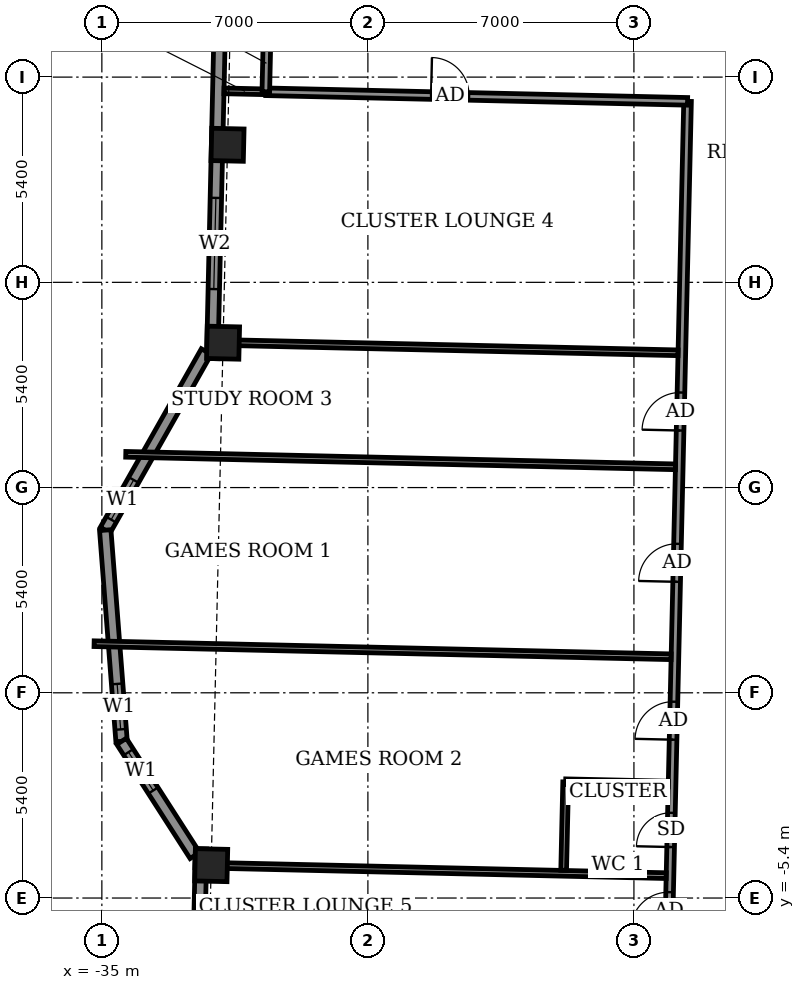
"""IFC4 building model, lengths in metres.
Left out: names, types, materials, properties, quantities, classifications, styles, units other than length and angle.
Written with IfcOpenShell. Run it as: python <this file> out.ifc"""

import sys

from ifc_helpers import new_model, si_unit, direction, frame, frame_2d, origin, origin_2d, place, context, subcontext, project, spatial, rectangle, extrude, element, fill, save


model = new_model("IFC4")
c1 = context("Model", 3, precision=1e-05, world=origin(), true_north=direction((0.0, 1.0)))
c2 = subcontext(c1, "Body", "Model", "MODEL_VIEW")
j1 = project(units=[si_unit("LENGTHUNIT", "METRE"), si_unit("PLANEANGLEUNIT", "RADIAN")], contexts=[c1])
p1 = place(None, origin())
s1 = spatial("IfcSite", under=j1, at=p1, CompositionType="ELEMENT")
p2 = place(p1, origin())
s2 = spatial("IfcBuilding", under=s1, at=p2, CompositionType="ELEMENT")
p3 = place(p2, frame((0.0, 0.0, 316.9)))
s3 = spatial("IfcBuildingStorey", under=s2, at=p3, CompositionType="ELEMENT", Elevation=316.9)
for number, where, z_axis, x_axis in (
    (1, (-32.123, -4.535, -0.55), (0.0, 0.0, 1.0), (-0.023, -1.0, 0.0)),
    (2, (-31.693, 14.419, -0.55), (0.0, 0.0, 1.0), (-0.023, -1.0, 0.0)),
    (3, (-31.811, 9.212, -0.55), (0.0, 0.0, 1.0), (-0.023, -1.0, 0.0)),
):
    element("IfcColumn", number, at=place(p3, frame(where, z_axis=z_axis, x_axis=x_axis)), inside=s3, PredefinedType="COLUMN", context=c2, shape_type="SweptSolid", body=[
        extrude(rectangle(XDim=0.85, YDim=0.85, at=origin_2d()), origin(), (0.0, 0.0, 1.0), 3.6),
    ])
p4 = place(p3, frame((-31.735, 24.69, 0.0), z_axis=(0.0, 0.0, 1.0), x_axis=(-0.022694199758, -0.999742453484, 0.0)))
e4 = element("IfcWall", 4, at=p4, inside=s3, PredefinedType="SOLIDWALL", context=c2, shape_type="SweptSolid", body=[
    extrude(rectangle(XDim=15.9, YDim=0.3, at=frame_2d((7.95, 0.0))), origin(), (0.0, 0.0, 1.0), 2.55),
])
p5 = place(p4, frame((1.939, 0.0, 0.0)))
e5 = element("IfcOpeningElement", 5, at=p5, cuts=e4, PredefinedType="OPENING", context=c2, shape_type="SweptSolid", body=[
    extrude(rectangle(XDim=1.5, YDim=2.4, at=frame_2d((0.75, 1.2))), frame((0.0, 0.16, 0.0), z_axis=(0.0, -1.0, 0.0), x_axis=(1.0, 0.0, 0.0)), (0.0, 0.0, 1.0), 0.32),
])
p6 = place(p4, frame((11.671, 0.0, 0.9)))
e6 = element("IfcOpeningElement", 6, at=p6, cuts=e4, PredefinedType="OPENING", context=c2, shape_type="SweptSolid", body=[
    extrude(rectangle(XDim=2.4, YDim=1.5, at=frame_2d((1.2, 0.75))), frame((0.0, 0.16, 0.0), z_axis=(0.0, -1.0, 0.0), x_axis=(1.0, 0.0, 0.0)), (0.0, 0.0, 1.0), 0.32),
])
p7 = place(p3, frame((-32.252, 8.978, 0.0), z_axis=(0.0, 0.0, 1.0), x_axis=(-0.492554919955, -0.870281363025, 0.0)))
e7 = element("IfcWall", 7, at=p7, inside=s3, PredefinedType="SOLIDWALL", context=c2, shape_type="SweptSolid", body=[
    extrude(rectangle(XDim=5.398, YDim=0.3, at=frame_2d((2.699, 0.0))), origin(), (0.0, 0.0, 1.0), 3.05),
])
p8 = place(p7, frame((3.881, 0.0, 0.9)))
e8 = element("IfcOpeningElement", 8, at=p8, cuts=e7, PredefinedType="OPENING", context=c2, shape_type="SweptSolid", body=[
    extrude(rectangle(XDim=1.2, YDim=1.5, at=frame_2d((0.6, 0.75))), frame((0.0, 0.16, 0.0), z_axis=(0.0, -1.0, 0.0), x_axis=(1.0, 0.0, 0.0)), (0.0, 0.0, 1.0), 0.32),
])
p9 = place(p3, frame((-34.911, 4.28, 0.0), z_axis=(0.0, 0.0, 1.0), x_axis=(0.077135284219, -0.997020635658, 0.0)))
e9 = element("IfcWall", 9, at=p9, inside=s3, PredefinedType="SOLIDWALL", context=c2, shape_type="SweptSolid", body=[
    extrude(rectangle(XDim=5.574, YDim=0.3, at=frame_2d((2.787, 0.0))), origin(), (0.0, 0.0, 1.0), 3.05),
])
p10 = place(p9, frame((4.058, 0.0, 0.9)))
e10 = element("IfcOpeningElement", 10, at=p10, cuts=e9, PredefinedType="OPENING", context=c2, shape_type="SweptSolid", body=[
    extrude(rectangle(XDim=1.2, YDim=1.5, at=frame_2d((0.6, 0.75))), frame((0.0, 0.16, 0.0), z_axis=(0.0, -1.0, 0.0), x_axis=(1.0, 0.0, 0.0)), (0.0, 0.0, 1.0), 0.32),
])
p11 = place(p3, frame((-34.481, -1.277, 0.0), z_axis=(0.0, 0.0, 1.0), x_axis=(0.540460234606, -0.841369558999, 0.0)))
e11 = element("IfcWall", 11, at=p11, inside=s3, PredefinedType="SOLIDWALL", context=c2, shape_type="SweptSolid", body=[
    extrude(rectangle(XDim=3.569, YDim=0.3, at=frame_2d((1.785, 0.0))), origin(), (0.0, 0.0, 1.0), 3.05),
])
p12 = place(p11, frame((0.338, 0.0, 0.9)))
e12 = element("IfcOpeningElement", 12, at=p12, cuts=e11, PredefinedType="OPENING", context=c2, shape_type="SweptSolid", body=[
    extrude(rectangle(XDim=1.2, YDim=1.5, at=frame_2d((0.6, 0.75))), frame((0.0, 0.16, 0.0), z_axis=(0.0, -1.0, 0.0), x_axis=(1.0, 0.0, 0.0)), (0.0, 0.0, 1.0), 0.32),
])
p13 = place(p3, frame((-32.388, -4.104, 0.0), z_axis=(0.0, 0.0, 1.0), x_axis=(-0.02270779533, -0.999742144771, 0.0)))
e13 = element("IfcWall", 13, at=p13, inside=s3, PredefinedType="SOLIDWALL", context=c2, shape_type="SweptSolid", body=[
    extrude(rectangle(XDim=16.299, YDim=0.3, at=frame_2d((8.149, 0.0))), origin(), (0.0, 0.0, 1.0), 2.55),
])
p14 = place(p13, frame((1.9, 0.0, 0.0)))
e14 = element("IfcOpeningElement", 14, at=p14, cuts=e13, PredefinedType="OPENING", context=c2, shape_type="SweptSolid", body=[
    extrude(rectangle(XDim=1.5, YDim=2.4, at=frame_2d((0.75, 1.2))), frame((0.0, 0.16, 0.0), z_axis=(0.0, -1.0, 0.0), x_axis=(1.0, 0.0, 0.0)), (0.0, 0.0, 1.0), 0.32),
])
p15 = place(p13, frame((6.396, 0.0, 0.9)))
e15 = element("IfcOpeningElement", 15, at=p15, cuts=e13, PredefinedType="OPENING", context=c2, shape_type="SweptSolid", body=[
    extrude(rectangle(XDim=0.9, YDim=1.5, at=frame_2d((0.45, 0.75))), frame((0.0, 0.16, 0.0), z_axis=(0.0, -1.0, 0.0), x_axis=(1.0, 0.0, 0.0)), (0.0, 0.0, 1.0), 0.32),
])
p16 = place(p13, frame((12.353, 0.0, 0.9)))
e16 = element("IfcOpeningElement", 16, at=p16, cuts=e13, PredefinedType="OPENING", context=c2, shape_type="SweptSolid", body=[
    extrude(rectangle(XDim=2.4, YDim=1.5, at=frame_2d((1.2, 0.75))), frame((0.0, 0.16, 0.0), z_axis=(0.0, -1.0, 0.0), x_axis=(1.0, 0.0, 0.0)), (0.0, 0.0, 1.0), 0.32),
])
p17 = place(p3, frame((-20.216, -12.081, 0.0), z_axis=(0.0, 0.0, 1.0), x_axis=(0.02267447203, 0.999742901109, 0.0)))
e17 = element("IfcWall", 17, at=p17, inside=s3, PredefinedType="PARTITIONING", context=c2, shape_type="SweptSolid", body=[
    extrude(rectangle(XDim=27.65, YDim=0.2, at=frame_2d((13.825, 0.0))), origin(), (0.0, 0.0, 1.0), 3.05),
])
p18 = place(p17, frame((18.987, 0.0, 0.0)))
e18 = element("IfcOpeningElement", 18, at=p18, cuts=e17, PredefinedType="OPENING", context=c2, shape_type="SweptSolid", body=[
    extrude(rectangle(XDim=1.0, YDim=2.1, at=frame_2d((0.5, 1.05))), frame((0.0, 0.11, 0.0), z_axis=(0.0, -1.0, 0.0), x_axis=(1.0, 0.0, 0.0)), (0.0, 0.0, 1.0), 0.22),
])
p19 = place(p17, frame((15.005, 0.0, 0.0)))
e19 = element("IfcOpeningElement", 19, at=p19, cuts=e17, PredefinedType="OPENING", context=c2, shape_type="SweptSolid", body=[
    extrude(rectangle(XDim=1.0, YDim=2.1, at=frame_2d((0.5, 1.05))), frame((0.0, 0.11, 0.0), z_axis=(0.0, -1.0, 0.0), x_axis=(1.0, 0.0, 0.0)), (0.0, 0.0, 1.0), 0.22),
])
p20 = place(p17, frame((10.85, 0.0, 0.0)))
e20 = element("IfcOpeningElement", 20, at=p20, cuts=e17, PredefinedType="OPENING", context=c2, shape_type="SweptSolid", body=[
    extrude(rectangle(XDim=1.0, YDim=2.1, at=frame_2d((0.5, 1.05))), frame((0.0, 0.11, 0.0), z_axis=(0.0, -1.0, 0.0), x_axis=(1.0, 0.0, 0.0)), (0.0, 0.0, 1.0), 0.22),
])
p21 = place(p17, frame((8.025, 0.0, 0.0)))
e21 = element("IfcOpeningElement", 21, at=p21, cuts=e17, PredefinedType="OPENING", context=c2, shape_type="SweptSolid", body=[
    extrude(rectangle(XDim=0.9, YDim=2.1, at=frame_2d((0.45, 1.05))), frame((0.0, 0.11, 0.0), z_axis=(0.0, -1.0, 0.0), x_axis=(1.0, 0.0, 0.0)), (0.0, 0.0, 1.0), 0.22),
])
p22 = place(p17, frame((5.837, 0.0, 0.0)))
e22 = element("IfcOpeningElement", 22, at=p22, cuts=e17, PredefinedType="OPENING", context=c2, shape_type="SweptSolid", body=[
    extrude(rectangle(XDim=1.0, YDim=2.1, at=frame_2d((0.5, 1.05))), frame((0.0, 0.11, 0.0), z_axis=(0.0, -1.0, 0.0), x_axis=(1.0, 0.0, 0.0)), (0.0, 0.0, 1.0), 0.22),
])
p23 = place(p17, frame((3.75, 0.0, 0.0)))
e23 = element("IfcOpeningElement", 23, at=p23, cuts=e17, PredefinedType="OPENING", context=c2, shape_type="SweptSolid", body=[
    extrude(rectangle(XDim=0.9, YDim=2.1, at=frame_2d((0.45, 1.05))), frame((0.0, 0.11, 0.0), z_axis=(0.0, -1.0, 0.0), x_axis=(1.0, 0.0, 0.0)), (0.0, 0.0, 1.0), 0.22),
])
p24 = place(p3, frame((-32.548, -4.529, 0.0), z_axis=(0.0, 0.0, 1.0), x_axis=(0.999741418644, -0.022739741597, 0.0)))
e24 = element("IfcWall", 24, at=p24, inside=s3, PredefinedType="PARTITIONING", context=c2, shape_type="SweptSolid", body=[
    extrude(rectangle(XDim=12.4, YDim=0.15, at=frame_2d((6.2, 0.0))), origin(), (0.0, 0.0, 1.0), 3.05),
])
p25 = place(p3, frame((-22.849, -4.67, 0.0), z_axis=(0.0, 0.0, 1.0), x_axis=(0.022885950011, 0.999738082346, 0.0)))
e25 = element("IfcWall", 25, at=p25, inside=s3, PredefinedType="PARTITIONING", context=c2, shape_type="SweptSolid", body=[
    extrude(rectangle(XDim=2.325, YDim=0.15, at=frame_2d((1.163, 0.0))), origin(), (0.0, 0.0, 1.0), 3.05),
])
p26 = place(p3, frame((-22.796, -2.34, 0.0), z_axis=(0.0, 0.0, 1.0), x_axis=(0.999746436932, -0.022518033722, 0.0)))
e26 = element("IfcWall", 26, at=p26, inside=s3, PredefinedType="PARTITIONING", context=c2, shape_type="SweptSolid", body=[
    extrude(rectangle(XDim=2.7, YDim=0.15, at=frame_2d((1.35, 0.0))), origin(), (0.0, 0.0, 1.0), 3.05),
])
p27 = place(p3, frame((-35.204, 1.292, 0.0), z_axis=(0.0, 0.0, 1.0), x_axis=(0.999743443088, -0.022650562973, 0.0)))
e27 = element("IfcWall", 27, at=p27, inside=s3, PredefinedType="PARTITIONING", context=c2, shape_type="SweptSolid", body=[
    extrude(rectangle(XDim=15.187, YDim=0.15, at=frame_2d((7.594, 0.0))), origin(), (0.0, 0.0, 1.0), 2.05),
])
p28 = place(p3, frame((-34.371, 6.275, 0.0), z_axis=(0.0, 0.0, 1.0), x_axis=(0.999741635135, -0.022730221665, 0.0)))
e28 = element("IfcWall", 28, at=p28, inside=s3, PredefinedType="PARTITIONING", context=c2, shape_type="SweptSolid", body=[
    extrude(rectangle(XDim=14.468, YDim=0.15, at=frame_2d((7.234, 0.0))), origin(), (0.0, 0.0, 1.0), 2.05),
])
p29 = place(p3, frame((-31.936, 9.22, 0.0), z_axis=(0.0, 0.0, 1.0), x_axis=(0.9997437175, -0.02263844782, 0.0)))
e29 = element("IfcWall", 29, at=p29, inside=s3, PredefinedType="PARTITIONING", context=c2, shape_type="SweptSolid", body=[
    extrude(rectangle(XDim=12.1, YDim=0.15, at=frame_2d((6.05, 0.0))), origin(), (0.0, 0.0, 1.0), 3.05),
])
p30 = place(p3, frame((-31.786, 15.838, 0.0), z_axis=(0.0, 0.0, 1.0), x_axis=(0.999745701647, -0.022550654924, 0.0)))
e30 = element("IfcWall", 30, at=p30, inside=s3, PredefinedType="PARTITIONING", context=c2, shape_type="SweptSolid", body=[
    extrude(rectangle(XDim=1.104, YDim=0.15, at=frame_2d((0.552, 0.0))), origin(), (0.0, 0.0, 1.0), 2.55),
])
p31 = place(p3, frame((-30.686, 15.814, 0.0), z_axis=(0.0, 0.0, 1.0), x_axis=(0.999742346277, -0.022698921993, 0.0)))
e31 = element("IfcWall", 31, at=p31, inside=s3, PredefinedType="PARTITIONING", context=c2, shape_type="SweptSolid", body=[
    extrude(rectangle(XDim=11.1, YDim=0.2, at=frame_2d((5.55, 0.0))), origin(), (0.0, 0.0, 1.0), 3.05),
])
p32 = place(p31, frame((4.35, 0.0, 0.0)))
e32 = element("IfcOpeningElement", 32, at=p32, cuts=e31, PredefinedType="OPENING", context=c2, shape_type="SweptSolid", body=[
    extrude(rectangle(XDim=1.0, YDim=2.1, at=frame_2d((0.5, 1.05))), frame((0.0, 0.11, 0.0), z_axis=(0.0, -1.0, 0.0), x_axis=(1.0, 0.0, 0.0)), (0.0, 0.0, 1.0), 0.22),
])
p33 = place(p3, frame((-30.686, 15.814, 0.0), z_axis=(0.0, 0.0, 1.0), x_axis=(0.022632637625, 0.99974384905, 0.0)))
e33 = element("IfcWall", 33, at=p33, inside=s3, PredefinedType="PARTITIONING", context=c2, shape_type="SweptSolid", body=[
    extrude(rectangle(XDim=1.5, YDim=0.2, at=frame_2d((0.75, 0.0))), origin(), (0.0, 0.0, 1.0), 3.05),
])
p34 = place(p3, frame((-30.652, 17.313, 0.0), z_axis=(0.0, 0.0, 1.0), x_axis=(0.999742623764, -0.02268669719, 0.0)))
e34 = element("IfcWall", 34, at=p34, inside=s3, PredefinedType="PARTITIONING", context=c2, shape_type="SweptSolid", body=[
    extrude(rectangle(XDim=58.8, YDim=0.2, at=frame_2d((29.4, 0.0))), origin(), (0.0, 0.0, 1.0), 3.05),
])
p35 = place(p34, frame((55.698, 0.0, 0.0)))
e35 = element("IfcOpeningElement", 35, at=p35, cuts=e34, PredefinedType="OPENING", context=c2, shape_type="SweptSolid", body=[
    extrude(rectangle(XDim=1.0, YDim=2.1, at=frame_2d((0.5, 1.05))), frame((0.0, 0.11, 0.0), z_axis=(0.0, -1.0, 0.0), x_axis=(1.0, 0.0, 0.0)), (0.0, 0.0, 1.0), 0.22),
])
p36 = place(p34, frame((49.0, 0.0, 0.0)))
e36 = element("IfcOpeningElement", 36, at=p36, cuts=e34, PredefinedType="OPENING", context=c2, shape_type="SweptSolid", body=[
    extrude(rectangle(XDim=0.9, YDim=2.1, at=frame_2d((0.45, 1.05))), frame((0.0, 0.11, 0.0), z_axis=(0.0, -1.0, 0.0), x_axis=(1.0, 0.0, 0.0)), (0.0, 0.0, 1.0), 0.22),
])
p37 = place(p34, frame((47.125, 0.0, 0.0)))
e37 = element("IfcOpeningElement", 37, at=p37, cuts=e34, PredefinedType="OPENING", context=c2, shape_type="SweptSolid", body=[
    extrude(rectangle(XDim=0.9, YDim=2.1, at=frame_2d((0.45, 1.05))), frame((0.0, 0.11, 0.0), z_axis=(0.0, -1.0, 0.0), x_axis=(1.0, 0.0, 0.0)), (0.0, 0.0, 1.0), 0.22),
])
p38 = place(p34, frame((40.425, 0.0, 0.0)))
e38 = element("IfcOpeningElement", 38, at=p38, cuts=e34, PredefinedType="OPENING", context=c2, shape_type="SweptSolid", body=[
    extrude(rectangle(XDim=0.9, YDim=2.1, at=frame_2d((0.45, 1.05))), frame((0.0, 0.11, 0.0), z_axis=(0.0, -1.0, 0.0), x_axis=(1.0, 0.0, 0.0)), (0.0, 0.0, 1.0), 0.22),
])
p39 = place(p34, frame((38.4, 0.0, 0.0)))
e39 = element("IfcOpeningElement", 39, at=p39, cuts=e34, PredefinedType="OPENING", context=c2, shape_type="SweptSolid", body=[
    extrude(rectangle(XDim=0.9, YDim=2.1, at=frame_2d((0.45, 1.05))), frame((0.0, 0.11, 0.0), z_axis=(0.0, -1.0, 0.0), x_axis=(1.0, 0.0, 0.0)), (0.0, 0.0, 1.0), 0.22),
])
p40 = place(p34, frame((31.6, 0.0, 0.0)))
e40 = element("IfcOpeningElement", 40, at=p40, cuts=e34, PredefinedType="OPENING", context=c2, shape_type="SweptSolid", body=[
    extrude(rectangle(XDim=0.9, YDim=2.1, at=frame_2d((0.45, 1.05))), frame((0.0, 0.11, 0.0), z_axis=(0.0, -1.0, 0.0), x_axis=(1.0, 0.0, 0.0)), (0.0, 0.0, 1.0), 0.22),
])
p41 = place(p34, frame((29.55, 0.0, 0.0)))
e41 = element("IfcOpeningElement", 41, at=p41, cuts=e34, PredefinedType="OPENING", context=c2, shape_type="SweptSolid", body=[
    extrude(rectangle(XDim=0.9, YDim=2.1, at=frame_2d((0.45, 1.05))), frame((0.0, 0.11, 0.0), z_axis=(0.0, -1.0, 0.0), x_axis=(1.0, 0.0, 0.0)), (0.0, 0.0, 1.0), 0.22),
])
p42 = place(p34, frame((22.625, 0.0, 0.0)))
e42 = element("IfcOpeningElement", 42, at=p42, cuts=e34, PredefinedType="OPENING", context=c2, shape_type="SweptSolid", body=[
    extrude(rectangle(XDim=0.9, YDim=2.1, at=frame_2d((0.45, 1.05))), frame((0.0, 0.11, 0.0), z_axis=(0.0, -1.0, 0.0), x_axis=(1.0, 0.0, 0.0)), (0.0, 0.0, 1.0), 0.22),
])
p43 = place(p34, frame((20.625, 0.0, 0.0)))
e43 = element("IfcOpeningElement", 43, at=p43, cuts=e34, PredefinedType="OPENING", context=c2, shape_type="SweptSolid", body=[
    extrude(rectangle(XDim=0.9, YDim=2.1, at=frame_2d((0.45, 1.05))), frame((0.0, 0.11, 0.0), z_axis=(0.0, -1.0, 0.0), x_axis=(1.0, 0.0, 0.0)), (0.0, 0.0, 1.0), 0.22),
])
p44 = place(p34, frame((13.825, 0.0, 0.0)))
e44 = element("IfcOpeningElement", 44, at=p44, cuts=e34, PredefinedType="OPENING", context=c2, shape_type="SweptSolid", body=[
    extrude(rectangle(XDim=0.9, YDim=2.1, at=frame_2d((0.45, 1.05))), frame((0.0, 0.11, 0.0), z_axis=(0.0, -1.0, 0.0), x_axis=(1.0, 0.0, 0.0)), (0.0, 0.0, 1.0), 0.22),
])
p45 = place(p34, frame((11.725, 0.0, 0.0)))
e45 = element("IfcOpeningElement", 45, at=p45, cuts=e34, PredefinedType="OPENING", context=c2, shape_type="SweptSolid", body=[
    extrude(rectangle(XDim=0.9, YDim=2.1, at=frame_2d((0.45, 1.05))), frame((0.0, 0.11, 0.0), z_axis=(0.0, -1.0, 0.0), x_axis=(1.0, 0.0, 0.0)), (0.0, 0.0, 1.0), 0.22),
])
p46 = place(p34, frame((1.85, 0.0, 0.0)))
e46 = element("IfcOpeningElement", 46, at=p46, cuts=e34, PredefinedType="OPENING", context=c2, shape_type="SweptSolid", body=[
    extrude(rectangle(XDim=1.0, YDim=2.1, at=frame_2d((0.5, 1.05))), frame((0.0, 0.11, 0.0), z_axis=(0.0, -1.0, 0.0), x_axis=(1.0, 0.0, 0.0)), (0.0, 0.0, 1.0), 0.22),
])
p47 = place(p34, frame((6.95, 0.0, 0.0)))
e47 = element("IfcOpeningElement", 47, at=p47, cuts=e34, PredefinedType="OPENING", context=c2, shape_type="SweptSolid", body=[
    extrude(rectangle(XDim=0.9, YDim=2.1, at=frame_2d((0.45, 1.05))), frame((0.0, 0.11, 0.0), z_axis=(0.0, -1.0, 0.0), x_axis=(1.0, 0.0, 0.0)), (0.0, 0.0, 1.0), 0.22),
])
p48 = place(p6, origin())
e48 = element("IfcWindow", 48, at=p48, inside=s3, PartitioningType="DOUBLE_PANEL_VERTICAL", PredefinedType="WINDOW", context=c2, shape_type="SweptSolid", body=[
    extrude(rectangle(XDim=2.4, YDim=1.5, at=frame_2d((1.2, 0.75))), frame((0.0, 0.03, 0.0), z_axis=(0.0, -1.0, 0.0), x_axis=(1.0, 0.0, 0.0)), (0.0, 0.0, 1.0), 0.06),
])
fill(e6, e48)
p49 = place(p8, origin())
e49 = element("IfcWindow", 49, at=p49, inside=s3, PartitioningType="SINGLE_PANEL", PredefinedType="WINDOW", context=c2, shape_type="SweptSolid", body=[
    extrude(rectangle(XDim=1.2, YDim=1.5, at=frame_2d((0.6, 0.75))), frame((0.0, 0.03, 0.0), z_axis=(0.0, -1.0, 0.0), x_axis=(1.0, 0.0, 0.0)), (0.0, 0.0, 1.0), 0.06),
])
fill(e8, e49)
p50 = place(p10, origin())
e50 = element("IfcWindow", 50, at=p50, inside=s3, PartitioningType="SINGLE_PANEL", PredefinedType="WINDOW", context=c2, shape_type="SweptSolid", body=[
    extrude(rectangle(XDim=1.2, YDim=1.5, at=frame_2d((0.6, 0.75))), frame((0.0, 0.03, 0.0), z_axis=(0.0, -1.0, 0.0), x_axis=(1.0, 0.0, 0.0)), (0.0, 0.0, 1.0), 0.06),
])
fill(e10, e50)
p51 = place(p12, origin())
e51 = element("IfcWindow", 51, at=p51, inside=s3, PartitioningType="SINGLE_PANEL", PredefinedType="WINDOW", context=c2, shape_type="SweptSolid", body=[
    extrude(rectangle(XDim=1.2, YDim=1.5, at=frame_2d((0.6, 0.75))), frame((0.0, 0.03, 0.0), z_axis=(0.0, -1.0, 0.0), x_axis=(1.0, 0.0, 0.0)), (0.0, 0.0, 1.0), 0.06),
])
fill(e12, e51)
p52 = place(p32, origin())
e52 = element("IfcDoor", 52, at=p52, inside=s3, OperationType="SINGLE_SWING_LEFT", PredefinedType="DOOR", context=c2, shape_type="SweptSolid", body=[
    extrude(rectangle(XDim=1.0, YDim=2.1, at=frame_2d((0.5, 1.05))), frame((0.0, 0.025, 0.0), z_axis=(0.0, -1.0, 0.0), x_axis=(1.0, 0.0, 0.0)), (0.0, 0.0, 1.0), 0.05),
])
fill(e32, e52)
p53 = place(p18, origin())
e53 = element("IfcDoor", 53, at=p53, inside=s3, OperationType="SINGLE_SWING_RIGHT", PredefinedType="DOOR", context=c2, shape_type="SweptSolid", body=[
    extrude(rectangle(XDim=1.0, YDim=2.1, at=frame_2d((0.5, 1.05))), frame((0.0, 0.025, 0.0), z_axis=(0.0, -1.0, 0.0), x_axis=(1.0, 0.0, 0.0)), (0.0, 0.0, 1.0), 0.05),
])
fill(e18, e53)
p54 = place(p19, origin())
e54 = element("IfcDoor", 54, at=p54, inside=s3, OperationType="SINGLE_SWING_LEFT", PredefinedType="DOOR", context=c2, shape_type="SweptSolid", body=[
    extrude(rectangle(XDim=1.0, YDim=2.1, at=frame_2d((0.5, 1.05))), frame((0.0, 0.025, 0.0), z_axis=(0.0, -1.0, 0.0), x_axis=(1.0, 0.0, 0.0)), (0.0, 0.0, 1.0), 0.05),
])
fill(e19, e54)
p55 = place(p20, origin())
e55 = element("IfcDoor", 55, at=p55, inside=s3, OperationType="SINGLE_SWING_RIGHT", PredefinedType="DOOR", context=c2, shape_type="SweptSolid", body=[
    extrude(rectangle(XDim=1.0, YDim=2.1, at=frame_2d((0.5, 1.05))), frame((0.0, 0.025, 0.0), z_axis=(0.0, -1.0, 0.0), x_axis=(1.0, 0.0, 0.0)), (0.0, 0.0, 1.0), 0.05),
])
fill(e20, e55)
p56 = place(p21, origin())
e56 = element("IfcDoor", 56, at=p56, inside=s3, OperationType="SINGLE_SWING_LEFT", PredefinedType="DOOR", context=c2, shape_type="SweptSolid", body=[
    extrude(rectangle(XDim=0.9, YDim=2.1, at=frame_2d((0.45, 1.05))), frame((0.0, 0.025, 0.0), z_axis=(0.0, -1.0, 0.0), x_axis=(1.0, 0.0, 0.0)), (0.0, 0.0, 1.0), 0.05),
])
fill(e21, e56)
p57 = place(p22, origin())
e57 = element("IfcDoor", 57, at=p57, inside=s3, OperationType="SINGLE_SWING_LEFT", PredefinedType="DOOR", context=c2, shape_type="SweptSolid", body=[
    extrude(rectangle(XDim=1.0, YDim=2.1, at=frame_2d((0.5, 1.05))), frame((0.0, 0.025, 0.0), z_axis=(0.0, -1.0, 0.0), x_axis=(1.0, 0.0, 0.0)), (0.0, 0.0, 1.0), 0.05),
])
fill(e22, e57)
save(model, sys.argv[1])
